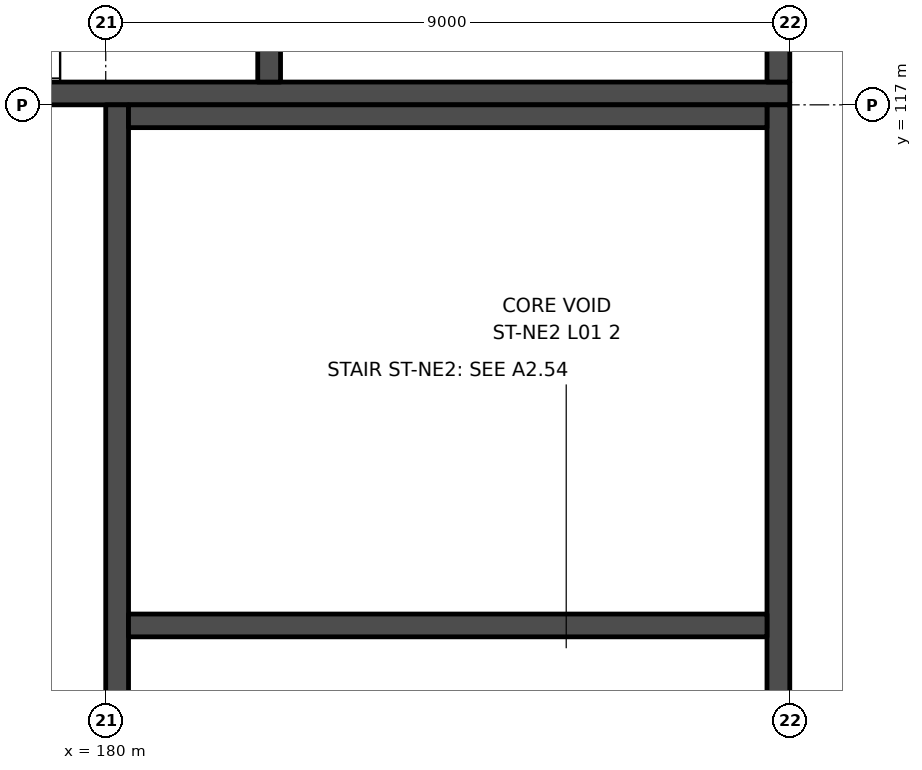
"""IFC4 building model, lengths in metres.
Left out: names, types, materials, properties, quantities, classifications, styles, units other than length and angle.
Written with IfcOpenShell. Run it as: python <this file> out.ifc"""

import sys

from ifc_helpers import new_model, si_unit, direction, frame, frame_2d, origin, place, context, subcontext, project, spatial, rectangle, extrude, element, save


model = new_model("IFC4")
c1 = context("Model", 3, precision=1e-05, world=origin(), true_north=direction((0.0, 1.0)))
c2 = subcontext(c1, "Body", "Model", "MODEL_VIEW")
j1 = project(units=[si_unit("LENGTHUNIT", "METRE"), si_unit("PLANEANGLEUNIT", "RADIAN")], contexts=[c1])
p1 = place(None, origin())
s1 = spatial("IfcSite", under=j1, at=p1, CompositionType="ELEMENT")
p2 = place(p1, origin())
s2 = spatial("IfcBuilding", under=s1, at=p2, CompositionType="ELEMENT")
p3 = place(p2, frame((0.0, 0.0, 7.0)))
s3 = spatial("IfcBuildingStorey", under=s2, at=p3, CompositionType="ELEMENT", Elevation=7.0)
p4 = place(p3, frame((170.75, 117.15, 0.0), z_axis=(0.0, 0.0, 1.0), x_axis=(1.0, 0.0, 0.0)))
e1 = element("IfcWall", 1, at=p4, inside=s3, PredefinedType="SHEAR", context=c2, shape_type="SweptSolid", body=[
    extrude(rectangle(XDim=18.25, YDim=0.3, at=frame_2d((9.125, 0.0))), origin(), (0.0, 0.0, 1.0), 4.5),
])
p5 = place(p4, frame((1.75, 0.0, 0.0)))
e2 = element("IfcOpeningElement", 2, at=p5, cuts=e1, PredefinedType="OPENING", context=c2, shape_type="SweptSolid", body=[
    extrude(rectangle(XDim=1.2, YDim=2.1, at=frame_2d((0.6, 1.05))), frame((0.0, 0.16, 0.0), z_axis=(0.0, -1.0, 0.0), x_axis=(1.0, 0.0, 0.0)), (0.0, 0.0, 1.0), 0.32),
])
for number, where, z_axis, x_axis in (
    (3, (188.85, 117.3, 0.0), (0.0, 0.0, 1.0), (0.0, 1.0, 0.0)),
    (4, (182.15, 117.3, 0.0), (0.0, 0.0, 1.0), (0.0, 1.0, 0.0)),
):
    element("IfcWall", number, at=place(p3, frame(where, z_axis=z_axis, x_axis=x_axis)), inside=s3, PredefinedType="SHEAR", context=c2, shape_type="SweptSolid", body=[
        extrude(rectangle(XDim=8.4, YDim=0.3, at=frame_2d((4.2, 0.0))), origin(), (0.0, 0.0, 1.0), 4.5),
    ])
p6 = place(p3, frame((180.15, 99.0, 0.0), z_axis=(0.0, 0.0, 1.0), x_axis=(0.0, 1.0, 0.0)))
e5 = element("IfcWall", 5, at=p6, inside=s3, PredefinedType="SHEAR", context=c2, shape_type="SweptSolid", body=[
    extrude(rectangle(XDim=18.0, YDim=0.3, at=frame_2d((9.0, 0.0))), origin(), (0.0, 0.0, 1.0), 4.5),
])
p7 = place(p6, frame((1.5, 0.0, 0.0)))
e6 = element("IfcOpeningElement", 6, at=p7, cuts=e5, PredefinedType="OPENING", context=c2, shape_type="SweptSolid", body=[
    extrude(rectangle(XDim=1.2, YDim=2.1, at=frame_2d((0.6, 1.05))), frame((0.0, 0.16, 0.0), z_axis=(0.0, -1.0, 0.0), x_axis=(1.0, 0.0, 0.0)), (0.0, 0.0, 1.0), 0.32),
])
p8 = place(p3, frame((188.85, 99.0, 0.0), z_axis=(0.0, 0.0, 1.0), x_axis=(0.0, 1.0, 0.0)))
e7 = element("IfcWall", 7, at=p8, inside=s3, PredefinedType="SHEAR", context=c2, shape_type="SweptSolid", body=[
    extrude(rectangle(XDim=18.0, YDim=0.3, at=frame_2d((9.0, 0.0))), origin(), (0.0, 0.0, 1.0), 4.5),
])
for number, where, z_axis, x_axis in (
    (8, (180.3, 116.85, 0.0), (0.0, 0.0, 1.0), (1.0, 0.0, 0.0)),
    (9, (180.3, 110.15, 0.0), (0.0, 0.0, 1.0), (1.0, 0.0, 0.0)),
):
    element("IfcWall", number, at=place(p3, frame(where, z_axis=z_axis, x_axis=x_axis)), inside=s3, PredefinedType="SHEAR", context=c2, shape_type="SweptSolid", body=[
        extrude(rectangle(XDim=8.4, YDim=0.3, at=frame_2d((4.2, 0.0))), origin(), (0.0, 0.0, 1.0), 4.5),
    ])
save(model, sys.argv[1])
